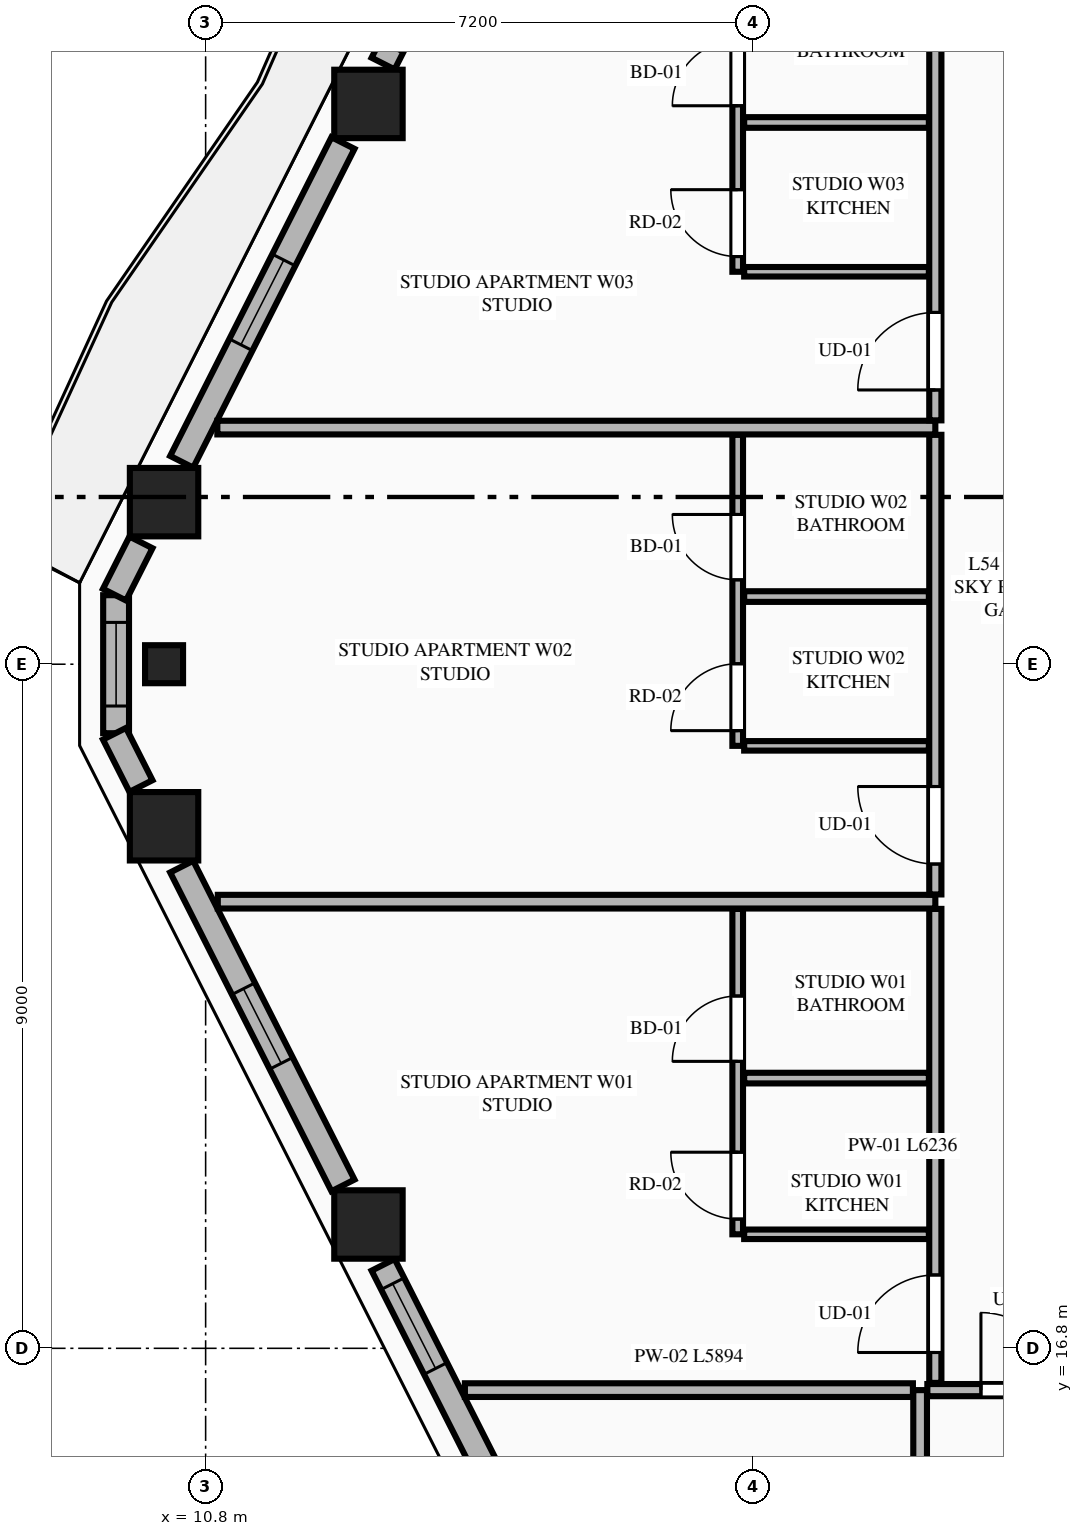
"""IFC4 building model, lengths in metres.
Left out: names, types, materials, properties, quantities, classifications, styles, units other than length and angle.
Written with IfcOpenShell. Run it as: python <this file> out.ifc"""

import sys

from ifc_helpers import new_model, si_unit, direction, frame, frame_2d, origin, origin_2d, place, context, subcontext, project, spatial, rectangle, extrude, element, fill, save


model = new_model("IFC4")
c1 = context("Model", 3, precision=1e-05, world=origin(), true_north=direction((0.0, 1.0)))
c2 = subcontext(c1, "Body", "Model", "MODEL_VIEW")
j1 = project(units=[si_unit("LENGTHUNIT", "METRE"), si_unit("PLANEANGLEUNIT", "RADIAN")], contexts=[c1])
p1 = place(None, origin())
s1 = spatial("IfcSite", under=j1, at=p1, CompositionType="ELEMENT")
p2 = place(p1, origin())
s2 = spatial("IfcBuilding", under=s1, at=p2, CompositionType="ELEMENT")
p3 = place(p2, frame((0.0, 0.0, 203.85)))
s3 = spatial("IfcBuildingStorey", under=s2, at=p3, CompositionType="ELEMENT", Elevation=203.85)
for number, where, z_axis, x_axis in (
    (1, (12.942, 33.171, 0.0), (0.0, 0.0, 1.0), (1.0, 0.0, 0.0)),
    (2, (10.253, 27.932, 0.0), (0.0, 0.0, 1.0), (1.0, 0.0, 0.0)),
    (3, (10.253, 23.668, 0.0), (0.0, 0.0, 1.0), (1.0, 0.0, 0.0)),
    (4, (12.942, 18.429, 0.0), (0.0, 0.0, 1.0), (1.0, 0.0, 0.0)),
):
    element("IfcColumn", number, at=place(p3, frame(where, z_axis=z_axis, x_axis=x_axis)), inside=s3, PredefinedType="COLUMN", context=c2, shape_type="SweptSolid", body=[
        extrude(rectangle(XDim=0.9, YDim=0.9, at=origin_2d()), origin(), (0.0, 0.0, 1.0), 3.55),
    ])
p4 = place(p3, frame((10.253, 25.8, 0.0), z_axis=(0.0, 0.0, 1.0), x_axis=(0.0, -1.0, 0.0)))
e5 = element("IfcColumn", 5, at=p4, inside=s3, PredefinedType="PILASTER", context=c2, shape_type="SweptSolid", body=[
    extrude(rectangle(XDim=0.5, YDim=0.35, at=origin_2d()), origin(), (0.0, 0.0, 1.0), 3.55),
])
p5 = place(p3, frame((9.622, 26.708, 0.0), z_axis=(0.0, 0.0, 1.0), x_axis=(0.0, -1.0, 0.0)))
e6 = element("IfcWall", 6, at=p5, inside=s3, PredefinedType="STANDARD", context=c2, shape_type="SweptSolid", body=[
    extrude(rectangle(XDim=1.816, YDim=0.34, at=frame_2d((0.908, 0.0))), origin(), (0.0, 0.0, 1.0), 3.35),
])
p6 = place(p5, frame((0.358, 0.0, 0.75)))
e7 = element("IfcOpeningElement", 7, at=p6, cuts=e6, PredefinedType="OPENING", context=c2, shape_type="SweptSolid", body=[
    extrude(rectangle(XDim=1.1, YDim=2.0, at=frame_2d((0.55, 1.0))), frame((0.0, 0.18, 0.0), z_axis=(0.0, -1.0, 0.0), x_axis=(1.0, 0.0, 0.0)), (0.0, 0.0, 1.0), 0.36),
])
p7 = place(p3, frame((15.352, 38.083, 0.0), z_axis=(0.0, 0.0, 1.0), x_axis=(-0.451524246964, -0.89225884944, 0.0)))
e8 = element("IfcWall", 8, at=p7, inside=s3, PredefinedType="STANDARD", context=c2, shape_type="SweptSolid", body=[
    extrude(rectangle(XDim=4.91, YDim=0.34, at=frame_2d((2.455, 0.0))), origin(), (0.0, 0.0, 1.0), 2.883),
])
p8 = place(p7, frame((0.968, 0.0, 0.0)))
e9 = element("IfcOpeningElement", 9, at=p8, cuts=e8, PredefinedType="OPENING", context=c2, shape_type="SweptSolid", body=[
    extrude(rectangle(XDim=1.1, YDim=2.25, at=frame_2d((0.55, 1.125))), frame((0.0, 0.18, 0.0), z_axis=(0.0, -1.0, 0.0), x_axis=(1.0, 0.0, 0.0)), (0.0, 0.0, 1.0), 0.36),
])
p9 = place(p7, frame((3.569, 0.0, 0.75)))
e10 = element("IfcOpeningElement", 10, at=p9, cuts=e8, PredefinedType="OPENING", context=c2, shape_type="SweptSolid", body=[
    extrude(rectangle(XDim=1.1, YDim=1.983, at=frame_2d((0.55, 0.991))), frame((0.0, 0.18, 0.0), z_axis=(0.0, -1.0, 0.0), x_axis=(1.0, 0.0, 0.0)), (0.0, 0.0, 1.0), 0.36),
])
p10 = place(p3, frame((12.607, 32.657, 0.0), z_axis=(0.0, 0.0, 1.0), x_axis=(-0.451426298588, -0.892308409096, 0.0)))
e11 = element("IfcWall", 11, at=p10, inside=s3, PredefinedType="STANDARD", context=c2, shape_type="SweptSolid", body=[
    extrude(rectangle(XDim=4.7, YDim=0.34, at=frame_2d((2.35, 0.0))), origin(), (0.0, 0.0, 1.0), 2.883),
])
p11 = place(p10, frame((1.725, 0.0, 0.75)))
e12 = element("IfcOpeningElement", 12, at=p11, cuts=e11, PredefinedType="OPENING", context=c2, shape_type="SweptSolid", body=[
    extrude(rectangle(XDim=1.25, YDim=1.95, at=frame_2d((0.625, 0.975))), frame((0.0, 0.18, 0.0), z_axis=(0.0, -1.0, 0.0), x_axis=(1.0, 0.0, 0.0)), (0.0, 0.0, 1.0), 0.36),
])
for number, where, z_axis, x_axis in (
    (13, (9.949, 27.403, 0.0), (0.0, 0.0, 1.0), (-0.451, -0.892, 0.0)),
    (14, (9.601, 24.885, 0.0), (0.0, 0.0, 1.0), (0.451, -0.892, 0.0)),
):
    element("IfcWall", number, at=place(p3, frame(where, z_axis=z_axis, x_axis=x_axis)), inside=s3, PredefinedType="STANDARD", context=c2, shape_type="SweptSolid", body=[
        extrude(rectangle(XDim=0.771, YDim=0.34, at=frame_2d((0.385, 0.0))), origin(), (0.0, 0.0, 1.0), 3.35),
    ])
p12 = place(p3, frame((10.485, 23.137, 0.0), z_axis=(0.0, 0.0, 1.0), x_axis=(0.451447222193, -0.892297823361, 0.0)))
e15 = element("IfcWall", 15, at=p12, inside=s3, PredefinedType="STANDARD", context=c2, shape_type="SweptSolid", body=[
    extrude(rectangle(XDim=4.7, YDim=0.34, at=frame_2d((2.35, 0.0))), origin(), (0.0, 0.0, 1.0), 2.883),
])
p13 = place(p12, frame((1.8, 0.0, 0.75)))
e16 = element("IfcOpeningElement", 16, at=p13, cuts=e15, PredefinedType="OPENING", context=c2, shape_type="SweptSolid", body=[
    extrude(rectangle(XDim=1.1, YDim=1.983, at=frame_2d((0.55, 0.991))), frame((0.0, 0.18, 0.0), z_axis=(0.0, -1.0, 0.0), x_axis=(1.0, 0.0, 0.0)), (0.0, 0.0, 1.0), 0.36),
])
p14 = place(p3, frame((13.135, 17.898, 0.0), z_axis=(0.0, 0.0, 1.0), x_axis=(0.451544279509, -0.892248711763, 0.0)))
e17 = element("IfcWall", 17, at=p14, inside=s3, PredefinedType="STANDARD", context=c2, shape_type="SweptSolid", body=[
    extrude(rectangle(XDim=4.91, YDim=0.34, at=frame_2d((2.455, 0.0))), origin(), (0.0, 0.0, 1.0), 2.883),
])
p15 = place(p14, frame((0.278, 0.0, 0.75)))
e18 = element("IfcOpeningElement", 18, at=p15, cuts=e17, PredefinedType="OPENING", context=c2, shape_type="SweptSolid", body=[
    extrude(rectangle(XDim=1.25, YDim=1.95, at=frame_2d((0.625, 0.975))), frame((0.0, 0.18, 0.0), z_axis=(0.0, -1.0, 0.0), x_axis=(1.0, 0.0, 0.0)), (0.0, 0.0, 1.0), 0.36),
])
p16 = place(p14, frame((2.959, 0.0, 0.75)))
e19 = element("IfcOpeningElement", 19, at=p16, cuts=e17, PredefinedType="OPENING", context=c2, shape_type="SweptSolid", body=[
    extrude(rectangle(XDim=1.1, YDim=1.983, at=frame_2d((0.55, 0.991))), frame((0.0, 0.18, 0.0), z_axis=(0.0, -1.0, 0.0), x_axis=(1.0, 0.0, 0.0)), (0.0, 0.0, 1.0), 0.36),
])
p17 = place(p3, frame((20.2, 5.968, 0.0), z_axis=(0.0, 0.0, 1.0), x_axis=(0.0, 1.0, 0.0)))
e20 = element("IfcWall", 20, at=p17, inside=s3, PredefinedType="PARTITIONING", context=c2, shape_type="SweptSolid", body=[
    extrude(rectangle(XDim=10.282, YDim=0.18, at=frame_2d((5.141, 0.0))), origin(), (0.0, 0.0, 1.0), 3.35),
])
p18 = place(p3, frame((20.295, 16.25, 0.0), z_axis=(0.0, 0.0, 1.0), x_axis=(1.0, 0.0, 0.0)))
e21 = element("IfcWall", 21, at=p18, inside=s3, PredefinedType="PARTITIONING", context=c2, shape_type="SweptSolid", body=[
    extrude(rectangle(XDim=8.467, YDim=0.16, at=frame_2d((4.233, 0.0))), origin(), (0.0, 0.0, 1.0), 3.35),
])
p19 = place(p18, frame((0.705, 0.0, 0.0)))
e22 = element("IfcOpeningElement", 22, at=p19, cuts=e21, PredefinedType="OPENING", context=c2, shape_type="SweptSolid", body=[
    extrude(rectangle(XDim=1.02, YDim=2.25, at=frame_2d((0.51, 1.125))), frame((0.0, 0.09, 0.0), z_axis=(0.0, -1.0, 0.0), x_axis=(1.0, 0.0, 0.0)), (0.0, 0.0, 1.0), 0.18),
])
p20 = place(p3, frame((14.211, 16.25, 0.0), z_axis=(0.0, 0.0, 1.0), x_axis=(1.0, 0.0, 0.0)))
e23 = element("IfcWall", 23, at=p20, inside=s3, PredefinedType="PARTITIONING", context=c2, shape_type="SweptSolid", body=[
    extrude(rectangle(XDim=5.894, YDim=0.18, at=frame_2d((2.947, 0.0))), origin(), (0.0, 0.0, 1.0), 3.35),
])
p21 = place(p3, frame((20.4, 16.345, 0.0), z_axis=(0.0, 0.0, 1.0), x_axis=(0.0, 1.0, 0.0)))
e24 = element("IfcWall", 24, at=p21, inside=s3, PredefinedType="PARTITIONING", context=c2, shape_type="SweptSolid", body=[
    extrude(rectangle(XDim=6.236, YDim=0.16, at=frame_2d((3.118, 0.0))), origin(), (0.0, 0.0, 1.0), 3.35),
])
p22 = place(p21, frame((0.4, 0.0, 0.0)))
e25 = element("IfcOpeningElement", 25, at=p22, cuts=e24, PredefinedType="OPENING", context=c2, shape_type="SweptSolid", body=[
    extrude(rectangle(XDim=1.02, YDim=2.25, at=frame_2d((0.51, 1.125))), frame((0.0, 0.09, 0.0), z_axis=(0.0, -1.0, 0.0), x_axis=(1.0, 0.0, 0.0)), (0.0, 0.0, 1.0), 0.18),
])
p23 = place(p3, frame((17.885, 18.3, 0.0), z_axis=(0.0, 0.0, 1.0), x_axis=(1.0, 0.0, 0.0)))
e26 = element("IfcWall", 26, at=p23, inside=s3, PredefinedType="PARTITIONING", context=c2, shape_type="SweptSolid", body=[
    extrude(rectangle(XDim=2.43, YDim=0.125, at=frame_2d((1.215, 0.0))), origin(), (0.0, 0.0, 1.0), 2.807),
])
p24 = place(p3, frame((17.8, 18.3, 0.0), z_axis=(0.0, 0.0, 1.0), x_axis=(0.0, 1.0, 0.0)))
e27 = element("IfcWall", 27, at=p24, inside=s3, PredefinedType="PLUMBINGWALL", context=c2, shape_type="SweptSolid", body=[
    extrude(rectangle(XDim=4.281, YDim=0.14, at=frame_2d((2.141, 0.0))), origin(), (0.0, 0.0, 1.0), 3.35),
])
p25 = place(p24, frame((2.275, 0.0, 0.0)))
e28 = element("IfcOpeningElement", 28, at=p25, cuts=e27, PredefinedType="OPENING", context=c2, shape_type="SweptSolid", body=[
    extrude(rectangle(XDim=0.86, YDim=2.1, at=frame_2d((0.43, 1.05))), frame((0.0, 0.08, 0.0), z_axis=(0.0, -1.0, 0.0), x_axis=(1.0, 0.0, 0.0)), (0.0, 0.0, 1.0), 0.16),
])
p26 = place(p24, frame((0.2, 0.0, 0.0)))
e29 = element("IfcOpeningElement", 29, at=p26, cuts=e27, PredefinedType="OPENING", context=c2, shape_type="SweptSolid", body=[
    extrude(rectangle(XDim=0.88, YDim=2.15, at=frame_2d((0.44, 1.075))), frame((0.0, 0.08, 0.0), z_axis=(0.0, -1.0, 0.0), x_axis=(1.0, 0.0, 0.0)), (0.0, 0.0, 1.0), 0.16),
])
p27 = place(p3, frame((17.885, 20.355, 0.0), z_axis=(0.0, 0.0, 1.0), x_axis=(1.0, 0.0, 0.0)))
e30 = element("IfcWall", 30, at=p27, inside=s3, PredefinedType="PLUMBINGWALL", context=c2, shape_type="SweptSolid", body=[
    extrude(rectangle(XDim=2.43, YDim=0.14, at=frame_2d((1.215, 0.0))), origin(), (0.0, 0.0, 1.0), 3.35),
])
p28 = place(p3, frame((10.96, 22.676, 0.0), z_axis=(0.0, 0.0, 1.0), x_axis=(1.0, 0.0, 0.0)))
e31 = element("IfcWall", 31, at=p28, inside=s3, PredefinedType="PARTITIONING", context=c2, shape_type="SweptSolid", body=[
    extrude(rectangle(XDim=9.44, YDim=0.18, at=frame_2d((4.72, 0.0))), origin(), (0.0, 0.0, 1.0), 3.35),
])
p29 = place(p3, frame((20.4, 22.771, 0.0), z_axis=(0.0, 0.0, 1.0), x_axis=(0.0, 1.0, 0.0)))
e32 = element("IfcWall", 32, at=p29, inside=s3, PredefinedType="PARTITIONING", context=c2, shape_type="SweptSolid", body=[
    extrude(rectangle(XDim=6.047, YDim=0.16, at=frame_2d((3.023, 0.0))), origin(), (0.0, 0.0, 1.0), 3.35),
])
p30 = place(p29, frame((0.4, 0.0, 0.0)))
e33 = element("IfcOpeningElement", 33, at=p30, cuts=e32, PredefinedType="OPENING", context=c2, shape_type="SweptSolid", body=[
    extrude(rectangle(XDim=1.02, YDim=2.25, at=frame_2d((0.51, 1.125))), frame((0.0, 0.09, 0.0), z_axis=(0.0, -1.0, 0.0), x_axis=(1.0, 0.0, 0.0)), (0.0, 0.0, 1.0), 0.18),
])
p31 = place(p3, frame((17.885, 24.726, 0.0), z_axis=(0.0, 0.0, 1.0), x_axis=(1.0, 0.0, 0.0)))
e34 = element("IfcWall", 34, at=p31, inside=s3, PredefinedType="PARTITIONING", context=c2, shape_type="SweptSolid", body=[
    extrude(rectangle(XDim=2.43, YDim=0.125, at=frame_2d((1.215, 0.0))), origin(), (0.0, 0.0, 1.0), 3.35),
])
p32 = place(p3, frame((17.8, 24.726, 0.0), z_axis=(0.0, 0.0, 1.0), x_axis=(0.0, 1.0, 0.0)))
e35 = element("IfcWall", 35, at=p32, inside=s3, PredefinedType="PLUMBINGWALL", context=c2, shape_type="SweptSolid", body=[
    extrude(rectangle(XDim=4.092, YDim=0.14, at=frame_2d((2.046, 0.0))), origin(), (0.0, 0.0, 1.0), 3.35),
])
p33 = place(p32, frame((2.184, 0.0, 0.0)))
e36 = element("IfcOpeningElement", 36, at=p33, cuts=e35, PredefinedType="OPENING", context=c2, shape_type="SweptSolid", body=[
    extrude(rectangle(XDim=0.86, YDim=2.1, at=frame_2d((0.43, 1.05))), frame((0.0, 0.08, 0.0), z_axis=(0.0, -1.0, 0.0), x_axis=(1.0, 0.0, 0.0)), (0.0, 0.0, 1.0), 0.16),
])
p34 = place(p32, frame((0.2, 0.0, 0.0)))
e37 = element("IfcOpeningElement", 37, at=p34, cuts=e35, PredefinedType="OPENING", context=c2, shape_type="SweptSolid", body=[
    extrude(rectangle(XDim=0.88, YDim=2.15, at=frame_2d((0.44, 1.075))), frame((0.0, 0.08, 0.0), z_axis=(0.0, -1.0, 0.0), x_axis=(1.0, 0.0, 0.0)), (0.0, 0.0, 1.0), 0.16),
])
p35 = place(p3, frame((17.885, 26.69, 0.0), z_axis=(0.0, 0.0, 1.0), x_axis=(1.0, 0.0, 0.0)))
e38 = element("IfcWall", 38, at=p35, inside=s3, PredefinedType="PLUMBINGWALL", context=c2, shape_type="SweptSolid", body=[
    extrude(rectangle(XDim=2.43, YDim=0.14, at=frame_2d((1.215, 0.0))), origin(), (0.0, 0.0, 1.0), 3.35),
])
p36 = place(p3, frame((10.954, 28.913, 0.0), z_axis=(0.0, 0.0, 1.0), x_axis=(1.0, 0.0, 0.0)))
e39 = element("IfcWall", 39, at=p36, inside=s3, PredefinedType="PARTITIONING", context=c2, shape_type="SweptSolid", body=[
    extrude(rectangle(XDim=9.446, YDim=0.18, at=frame_2d((4.723, 0.0))), origin(), (0.0, 0.0, 1.0), 3.35),
])
p37 = place(p3, frame((20.4, 29.008, 0.0), z_axis=(0.0, 0.0, 1.0), x_axis=(0.0, 1.0, 0.0)))
e40 = element("IfcWall", 40, at=p37, inside=s3, PredefinedType="PARTITIONING", context=c2, shape_type="SweptSolid", body=[
    extrude(rectangle(XDim=6.047, YDim=0.16, at=frame_2d((3.023, 0.0))), origin(), (0.0, 0.0, 1.0), 3.35),
])
p38 = place(p37, frame((0.4, 0.0, 0.0)))
e41 = element("IfcOpeningElement", 41, at=p38, cuts=e40, PredefinedType="OPENING", context=c2, shape_type="SweptSolid", body=[
    extrude(rectangle(XDim=1.02, YDim=2.25, at=frame_2d((0.51, 1.125))), frame((0.0, 0.09, 0.0), z_axis=(0.0, -1.0, 0.0), x_axis=(1.0, 0.0, 0.0)), (0.0, 0.0, 1.0), 0.18),
])
p39 = place(p3, frame((17.885, 30.963, 0.0), z_axis=(0.0, 0.0, 1.0), x_axis=(1.0, 0.0, 0.0)))
e42 = element("IfcWall", 42, at=p39, inside=s3, PredefinedType="PARTITIONING", context=c2, shape_type="SweptSolid", body=[
    extrude(rectangle(XDim=2.43, YDim=0.125, at=frame_2d((1.215, 0.0))), origin(), (0.0, 0.0, 1.0), 3.35),
])
p40 = place(p3, frame((17.8, 30.963, 0.0), z_axis=(0.0, 0.0, 1.0), x_axis=(0.0, 1.0, 0.0)))
e43 = element("IfcWall", 43, at=p40, inside=s3, PredefinedType="PLUMBINGWALL", context=c2, shape_type="SweptSolid", body=[
    extrude(rectangle(XDim=4.092, YDim=0.14, at=frame_2d((2.046, 0.0))), origin(), (0.0, 0.0, 1.0), 3.35),
])
p41 = place(p40, frame((2.184, 0.0, 0.0)))
e44 = element("IfcOpeningElement", 44, at=p41, cuts=e43, PredefinedType="OPENING", context=c2, shape_type="SweptSolid", body=[
    extrude(rectangle(XDim=0.86, YDim=2.1, at=frame_2d((0.43, 1.05))), frame((0.0, 0.08, 0.0), z_axis=(0.0, -1.0, 0.0), x_axis=(1.0, 0.0, 0.0)), (0.0, 0.0, 1.0), 0.16),
])
p42 = place(p40, frame((0.2, 0.0, 0.0)))
e45 = element("IfcOpeningElement", 45, at=p42, cuts=e43, PredefinedType="OPENING", context=c2, shape_type="SweptSolid", body=[
    extrude(rectangle(XDim=0.88, YDim=2.15, at=frame_2d((0.44, 1.075))), frame((0.0, 0.08, 0.0), z_axis=(0.0, -1.0, 0.0), x_axis=(1.0, 0.0, 0.0)), (0.0, 0.0, 1.0), 0.16),
])
p43 = place(p3, frame((17.885, 32.927, 0.0), z_axis=(0.0, 0.0, 1.0), x_axis=(1.0, 0.0, 0.0)))
e46 = element("IfcWall", 46, at=p43, inside=s3, PredefinedType="PLUMBINGWALL", context=c2, shape_type="SweptSolid", body=[
    extrude(rectangle(XDim=2.43, YDim=0.14, at=frame_2d((1.215, 0.0))), origin(), (0.0, 0.0, 1.0), 3.35),
])
p44 = place(p11, origin())
e47 = element("IfcWindow", 47, at=p44, inside=s3, PartitioningType="SINGLE_PANEL", PredefinedType="WINDOW", context=c2, shape_type="SweptSolid", body=[
    extrude(rectangle(XDim=1.25, YDim=1.95, at=frame_2d((0.625, 0.975))), frame((0.0, 0.03, 0.0), z_axis=(0.0, -1.0, 0.0), x_axis=(1.0, 0.0, 0.0)), (0.0, 0.0, 1.0), 0.06),
])
fill(e12, e47)
p45 = place(p13, origin())
e48 = element("IfcWindow", 48, at=p45, inside=s3, PartitioningType="SINGLE_PANEL", PredefinedType="WINDOW", context=c2, shape_type="SweptSolid", body=[
    extrude(rectangle(XDim=1.1, YDim=1.983, at=frame_2d((0.55, 0.991))), frame((0.0, 0.03, 0.0), z_axis=(0.0, -1.0, 0.0), x_axis=(1.0, 0.0, 0.0)), (0.0, 0.0, 1.0), 0.06),
])
fill(e16, e48)
p46 = place(p15, origin())
e49 = element("IfcWindow", 49, at=p46, inside=s3, PartitioningType="SINGLE_PANEL", PredefinedType="WINDOW", context=c2, shape_type="SweptSolid", body=[
    extrude(rectangle(XDim=1.25, YDim=1.95, at=frame_2d((0.625, 0.975))), frame((0.0, 0.03, 0.0), z_axis=(0.0, -1.0, 0.0), x_axis=(1.0, 0.0, 0.0)), (0.0, 0.0, 1.0), 0.06),
])
fill(e18, e49)
p47 = place(p19, origin())
e50 = element("IfcDoor", 50, at=p47, inside=s3, OperationType="SINGLE_SWING_LEFT", PredefinedType="DOOR", context=c2, shape_type="SweptSolid", body=[
    extrude(rectangle(XDim=1.02, YDim=2.25, at=frame_2d((0.51, 1.125))), frame((0.0, 0.025, 0.0), z_axis=(0.0, -1.0, 0.0), x_axis=(1.0, 0.0, 0.0)), (0.0, 0.0, 1.0), 0.05),
])
fill(e22, e50)
p48 = place(p25, origin())
e51 = element("IfcDoor", 51, at=p48, inside=s3, OperationType="SINGLE_SWING_LEFT", PredefinedType="DOOR", context=c2, shape_type="SweptSolid", body=[
    extrude(rectangle(XDim=0.86, YDim=2.1, at=frame_2d((0.43, 1.05))), frame((0.0, 0.025, 0.0), z_axis=(0.0, -1.0, 0.0), x_axis=(1.0, 0.0, 0.0)), (0.0, 0.0, 1.0), 0.05),
])
fill(e28, e51)
p49 = place(p22, origin())
e52 = element("IfcDoor", 52, at=p49, inside=s3, OperationType="SINGLE_SWING_LEFT", PredefinedType="DOOR", context=c2, shape_type="SweptSolid", body=[
    extrude(rectangle(XDim=1.02, YDim=2.25, at=frame_2d((0.51, 1.125))), frame((0.0, 0.025, 0.0), z_axis=(0.0, -1.0, 0.0), x_axis=(1.0, 0.0, 0.0)), (0.0, 0.0, 1.0), 0.05),
])
fill(e25, e52)
p50 = place(p26, origin())
e53 = element("IfcDoor", 53, at=p50, inside=s3, OperationType="SINGLE_SWING_RIGHT", PredefinedType="DOOR", context=c2, shape_type="SweptSolid", body=[
    extrude(rectangle(XDim=0.88, YDim=2.15, at=frame_2d((0.44, 1.075))), frame((0.0, 0.025, 0.0), z_axis=(0.0, -1.0, 0.0), x_axis=(1.0, 0.0, 0.0)), (0.0, 0.0, 1.0), 0.05),
])
fill(e29, e53)
p51 = place(p33, origin())
e54 = element("IfcDoor", 54, at=p51, inside=s3, OperationType="SINGLE_SWING_RIGHT", PredefinedType="DOOR", context=c2, shape_type="SweptSolid", body=[
    extrude(rectangle(XDim=0.86, YDim=2.1, at=frame_2d((0.43, 1.05))), frame((0.0, 0.025, 0.0), z_axis=(0.0, -1.0, 0.0), x_axis=(1.0, 0.0, 0.0)), (0.0, 0.0, 1.0), 0.05),
])
fill(e36, e54)
p52 = place(p30, origin())
e55 = element("IfcDoor", 55, at=p52, inside=s3, OperationType="SINGLE_SWING_RIGHT", PredefinedType="DOOR", context=c2, shape_type="SweptSolid", body=[
    extrude(rectangle(XDim=1.02, YDim=2.25, at=frame_2d((0.51, 1.125))), frame((0.0, 0.025, 0.0), z_axis=(0.0, -1.0, 0.0), x_axis=(1.0, 0.0, 0.0)), (0.0, 0.0, 1.0), 0.05),
])
fill(e33, e55)
p53 = place(p34, origin())
e56 = element("IfcDoor", 56, at=p53, inside=s3, OperationType="SINGLE_SWING_LEFT", PredefinedType="DOOR", context=c2, shape_type="SweptSolid", body=[
    extrude(rectangle(XDim=0.88, YDim=2.15, at=frame_2d((0.44, 1.075))), frame((0.0, 0.025, 0.0), z_axis=(0.0, -1.0, 0.0), x_axis=(1.0, 0.0, 0.0)), (0.0, 0.0, 1.0), 0.05),
])
fill(e37, e56)
p54 = place(p41, origin())
e57 = element("IfcDoor", 57, at=p54, inside=s3, OperationType="SINGLE_SWING_LEFT", PredefinedType="DOOR", context=c2, shape_type="SweptSolid", body=[
    extrude(rectangle(XDim=0.86, YDim=2.1, at=frame_2d((0.43, 1.05))), frame((0.0, 0.025, 0.0), z_axis=(0.0, -1.0, 0.0), x_axis=(1.0, 0.0, 0.0)), (0.0, 0.0, 1.0), 0.05),
])
fill(e44, e57)
p55 = place(p38, origin())
e58 = element("IfcDoor", 58, at=p55, inside=s3, OperationType="SINGLE_SWING_LEFT", PredefinedType="DOOR", context=c2, shape_type="SweptSolid", body=[
    extrude(rectangle(XDim=1.02, YDim=2.25, at=frame_2d((0.51, 1.125))), frame((0.0, 0.025, 0.0), z_axis=(0.0, -1.0, 0.0), x_axis=(1.0, 0.0, 0.0)), (0.0, 0.0, 1.0), 0.05),
])
fill(e41, e58)
p56 = place(p42, origin())
e59 = element("IfcDoor", 59, at=p56, inside=s3, OperationType="SINGLE_SWING_RIGHT", PredefinedType="DOOR", context=c2, shape_type="SweptSolid", body=[
    extrude(rectangle(XDim=0.88, YDim=2.15, at=frame_2d((0.44, 1.075))), frame((0.0, 0.025, 0.0), z_axis=(0.0, -1.0, 0.0), x_axis=(1.0, 0.0, 0.0)), (0.0, 0.0, 1.0), 0.05),
])
fill(e45, e59)
p57 = place(p6, origin())
e60 = element("IfcWindow", 60, at=p57, inside=s3, PartitioningType="SINGLE_PANEL", PredefinedType="WINDOW", context=c2, shape_type="SweptSolid", body=[
    extrude(rectangle(XDim=1.1, YDim=2.0, at=frame_2d((0.55, 1.0))), frame((0.0, 0.03, 0.0), z_axis=(0.0, -1.0, 0.0), x_axis=(1.0, 0.0, 0.0)), (0.0, 0.0, 1.0), 0.06),
])
fill(e7, e60)
save(model, sys.argv[1])
